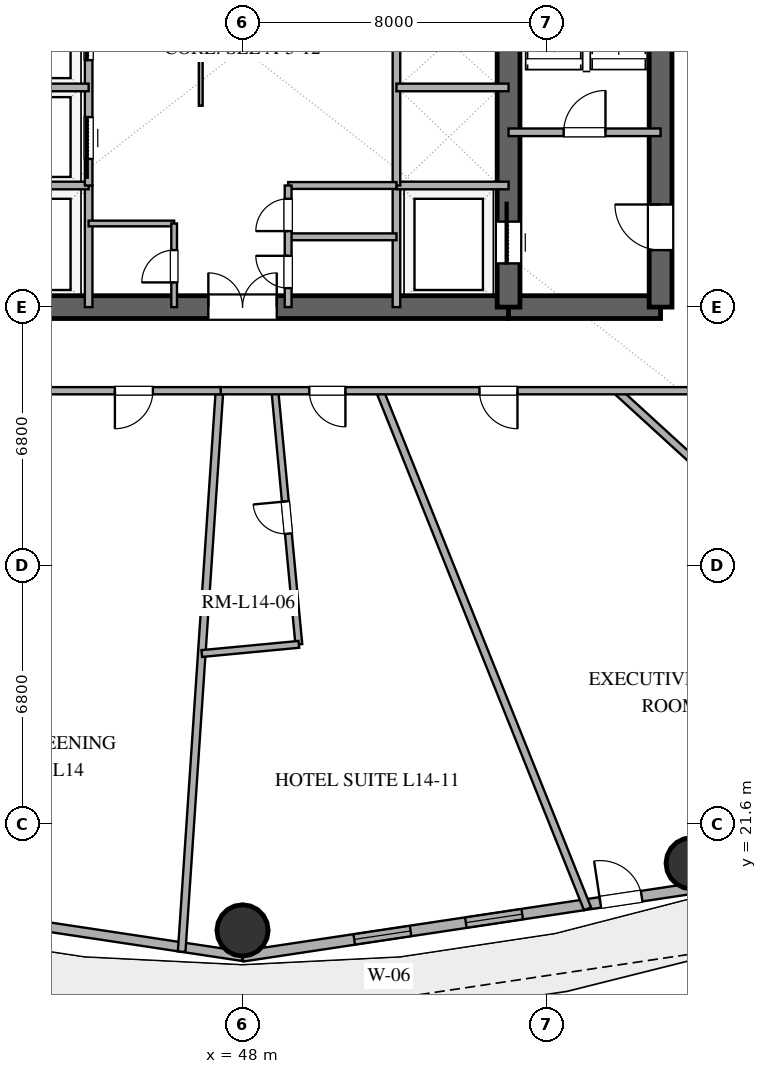
"""IFC4 building model, lengths in metres.
Left out: names, types, materials, properties, quantities, classifications, styles, units other than length and angle.
Written with IfcOpenShell. Run it as: python <this file> out.ifc"""

import sys

from ifc_helpers import new_model, si_unit, direction, frame, frame_2d, origin, origin_2d, place, context, subcontext, project, spatial, rectangle, hollow_circle, extrude, element, fill, save


model = new_model("IFC4")
c1 = context("Model", 3, precision=1e-05, world=origin(), true_north=direction((0.0, 1.0)))
c2 = subcontext(c1, "Body", "Model", "MODEL_VIEW")
j1 = project(units=[si_unit("LENGTHUNIT", "METRE"), si_unit("PLANEANGLEUNIT", "RADIAN")], contexts=[c1])
p1 = place(None, origin())
s1 = spatial("IfcSite", under=j1, at=p1, CompositionType="ELEMENT")
p2 = place(p1, origin())
s2 = spatial("IfcBuilding", under=s1, at=p2, CompositionType="ELEMENT")
p3 = place(p2, frame((0.0, 0.0, 60.6)))
s3 = spatial("IfcBuildingStorey", under=s2, at=p3, CompositionType="ELEMENT", Elevation=60.6)
p4 = place(p3, frame((41.0, 35.2, 0.0), z_axis=(0.0, 0.0, 1.0), x_axis=(1.0, 0.0, 0.0)))
e1 = element("IfcWall", 1, at=p4, inside=s3, PredefinedType="SHEAR", context=c2, shape_type="SweptSolid", body=[
    extrude(rectangle(XDim=14.0, YDim=0.6, at=frame_2d((7.0, 0.0))), origin(), (0.0, 0.0, 1.0), 3.38),
])
p5 = place(p4, frame((6.1, 0.0, 0.0)))
e2 = element("IfcOpeningElement", 2, at=p5, cuts=e1, PredefinedType="OPENING", context=c2, shape_type="SweptSolid", body=[
    extrude(rectangle(XDim=1.8, YDim=2.25, at=frame_2d((0.9, 1.125))), frame((0.0, 0.31, 0.0), z_axis=(0.0, -1.0, 0.0), x_axis=(1.0, 0.0, 0.0)), (0.0, 0.0, 1.0), 0.62),
])
p6 = place(p3, frame((55.0, 35.2, 0.0), z_axis=(0.0, 0.0, 1.0), x_axis=(1.0, 0.0, 0.0)))
e3 = element("IfcWall", 3, at=p6, inside=s3, PredefinedType="SHEAR", context=c2, shape_type="SweptSolid", body=[
    extrude(rectangle(XDim=4.0, YDim=0.6, at=frame_2d((2.0, 0.0))), origin(), (0.0, 0.0, 1.0), 3.38),
])
p7 = place(p3, frame((59.0, 35.2, 0.0), z_axis=(0.0, 0.0, 1.0), x_axis=(0.0, 1.0, 0.0)))
e4 = element("IfcWall", 4, at=p7, inside=s3, PredefinedType="SHEAR", context=c2, shape_type="SweptSolid", body=[
    extrude(rectangle(XDim=13.6, YDim=0.6, at=frame_2d((6.8, 0.0))), origin(), (0.0, 0.0, 1.0), 3.38),
])
p8 = place(p7, frame((1.5, 0.0, 0.0)))
e5 = element("IfcOpeningElement", 5, at=p8, cuts=e4, PredefinedType="OPENING", context=c2, shape_type="SweptSolid", body=[
    extrude(rectangle(XDim=1.2, YDim=2.15, at=frame_2d((0.6, 1.075))), frame((0.0, 0.31, 0.0), z_axis=(0.0, -1.0, 0.0), x_axis=(1.0, 0.0, 0.0)), (0.0, 0.0, 1.0), 0.62),
])
p9 = place(p3, frame((55.0, 35.2, 0.0), z_axis=(0.0, 0.0, 1.0), x_axis=(0.0, 1.0, 0.0)))
e6 = element("IfcWall", 6, at=p9, inside=s3, PredefinedType="SHEAR", context=c2, shape_type="SweptSolid", body=[
    extrude(rectangle(XDim=13.6, YDim=0.6, at=frame_2d((6.8, 0.0))), origin(), (0.0, 0.0, 1.0), 3.38),
])
p10 = place(p9, frame((1.15, 0.0, 0.0)))
e7 = element("IfcOpeningElement", 7, at=p10, cuts=e6, PredefinedType="OPENING", context=c2, shape_type="SweptSolid", body=[
    extrude(rectangle(XDim=1.1, YDim=2.2, at=frame_2d((0.55, 1.1))), frame((0.0, 0.31, 0.0), z_axis=(0.0, -1.0, 0.0), x_axis=(1.0, 0.0, 0.0)), (0.0, 0.0, 1.0), 0.62),
])
for number, where, z_axis, x_axis in (
    (8, (48.0, 18.8, 0.0), (0.0, 0.0, 1.0), (1.0, 0.0, 0.0)),
    (9, (59.818, 20.566, 0.0), (0.0, 0.0, 1.0), (1.0, 0.0, 0.0)),
):
    element("IfcColumn", number, at=place(p3, frame(where, z_axis=z_axis, x_axis=x_axis)), inside=s3, PredefinedType="COLUMN", context=c2, shape_type="SweptSolid", body=[
        extrude(hollow_circle(Radius=0.675, WallThickness=0.036, at=origin_2d()), origin(), (0.0, 0.0, 1.0), 3.38),
    ])
p11 = place(p3, frame((35.922, 19.938, 0.0), z_axis=(0.0, 0.0, 1.0), x_axis=(0.988864835849, -0.148816452121, 0.0)))
e10 = element("IfcWall", 10, at=p11, inside=s3, PredefinedType="SOLIDWALL", context=c2, shape_type="SweptSolid", body=[
    extrude(rectangle(XDim=12.214, YDim=0.25, at=frame_2d((6.107, 0.0))), origin(), (0.0, 0.0, 1.0), 3.38),
])
p12 = place(p3, frame((48.0, 18.12, 0.0), z_axis=(0.0, 0.0, 1.0), x_axis=(0.988864835849, 0.148816452121, 0.0)))
e11 = element("IfcWall", 11, at=p12, inside=s3, PredefinedType="SOLIDWALL", context=c2, shape_type="SweptSolid", body=[
    extrude(rectangle(XDim=12.214, YDim=0.28, at=frame_2d((6.107, 0.0))), origin(), (0.0, 0.0, 1.0), 3.38),
])
p13 = place(p12, frame((2.972, 0.0, 0.85)))
e12 = element("IfcOpeningElement", 12, at=p13, cuts=e11, PredefinedType="OPENING", context=c2, shape_type="SweptSolid", body=[
    extrude(rectangle(XDim=1.5, YDim=2.0, at=frame_2d((0.75, 1.0))), frame((0.0, 0.15, 0.0), z_axis=(0.0, -1.0, 0.0), x_axis=(1.0, 0.0, 0.0)), (0.0, 0.0, 1.0), 0.3),
])
p14 = place(p12, frame((5.942, 0.0, 0.85)))
e13 = element("IfcOpeningElement", 13, at=p14, cuts=e11, PredefinedType="OPENING", context=c2, shape_type="SweptSolid", body=[
    extrude(rectangle(XDim=1.5, YDim=2.0, at=frame_2d((0.75, 1.0))), frame((0.0, 0.15, 0.0), z_axis=(0.0, -1.0, 0.0), x_axis=(1.0, 0.0, 0.0)), (0.0, 0.0, 1.0), 0.3),
])
p15 = place(p12, frame((9.52, 0.0, 0.0)))
e14 = element("IfcOpeningElement", 14, at=p15, cuts=e11, PredefinedType="OPENING", context=c2, shape_type="SweptSolid", body=[
    extrude(rectangle(XDim=1.1, YDim=2.25, at=frame_2d((0.55, 1.125))), frame((0.0, 0.15, 0.0), z_axis=(0.0, -1.0, 0.0), x_axis=(1.0, 0.0, 0.0)), (0.0, 0.0, 1.0), 0.3),
])
p16 = place(p3, frame((55.0, 39.8, 0.0), z_axis=(0.0, 0.0, 1.0), x_axis=(1.0, 0.0, 0.0)))
e15 = element("IfcWall", 15, at=p16, inside=s3, PredefinedType="SOLIDWALL", context=c2, shape_type="SweptSolid", body=[
    extrude(rectangle(XDim=4.0, YDim=0.2, at=frame_2d((2.0, 0.0))), origin(), (0.0, 0.0, 1.0), 2.74),
])
p17 = place(p16, frame((1.45, 0.0, 0.0)))
e16 = element("IfcOpeningElement", 16, at=p17, cuts=e15, PredefinedType="OPENING", context=c2, shape_type="SweptSolid", body=[
    extrude(rectangle(XDim=1.1, YDim=2.15, at=frame_2d((0.55, 1.075))), frame((0.0, 0.11, 0.0), z_axis=(0.0, -1.0, 0.0), x_axis=(1.0, 0.0, 0.0)), (0.0, 0.0, 1.0), 0.22),
])
p18 = place(p3, frame((43.95, 35.2, 0.0), z_axis=(0.0, 0.0, 1.0), x_axis=(0.0, 1.0, 0.0)))
e17 = element("IfcWall", 17, at=p18, inside=s3, PredefinedType="SOLIDWALL", context=c2, shape_type="SweptSolid", body=[
    extrude(rectangle(XDim=3.2, YDim=0.2, at=frame_2d((1.6, 0.0))), origin(), (0.0, 0.0, 1.0), 2.74),
])
p19 = place(p3, frame((41.0, 38.4, 0.0), z_axis=(0.0, 0.0, 1.0), x_axis=(1.0, 0.0, 0.0)))
e18 = element("IfcWall", 18, at=p19, inside=s3, PredefinedType="SOLIDWALL", context=c2, shape_type="SweptSolid", body=[
    extrude(rectangle(XDim=2.95, YDim=0.2, at=frame_2d((1.475, 0.0))), origin(), (0.0, 0.0, 1.0), 2.74),
])
p20 = place(p3, frame((52.05, 35.2, 0.0), z_axis=(0.0, 0.0, 1.0), x_axis=(0.0, 1.0, 0.0)))
e19 = element("IfcWall", 19, at=p20, inside=s3, PredefinedType="SOLIDWALL", context=c2, shape_type="SweptSolid", body=[
    extrude(rectangle(XDim=3.2, YDim=0.2, at=frame_2d((1.6, 0.0))), origin(), (0.0, 0.0, 1.0), 2.74),
])
p21 = place(p3, frame((52.05, 38.4, 0.0), z_axis=(0.0, 0.0, 1.0), x_axis=(1.0, 0.0, 0.0)))
e20 = element("IfcWall", 20, at=p21, inside=s3, PredefinedType="SOLIDWALL", context=c2, shape_type="SweptSolid", body=[
    extrude(rectangle(XDim=2.95, YDim=0.2, at=frame_2d((1.475, 0.0))), origin(), (0.0, 0.0, 1.0), 2.74),
])
p22 = place(p3, frame((43.95, 38.4, 0.0), z_axis=(0.0, 0.0, 1.0), x_axis=(0.0, 1.0, 0.0)))
e21 = element("IfcWall", 21, at=p22, inside=s3, PredefinedType="SOLIDWALL", context=c2, shape_type="SweptSolid", body=[
    extrude(rectangle(XDim=7.8, YDim=0.2, at=frame_2d((3.9, 0.0))), origin(), (0.0, 0.0, 1.0), 2.74),
])
p23 = place(p22, frame((0.7, 0.0, 0.0)))
e22 = element("IfcOpeningElement", 22, at=p23, cuts=e21, PredefinedType="OPENING", context=c2, shape_type="SweptSolid", body=[
    extrude(rectangle(XDim=1.1, YDim=2.2, at=frame_2d((0.55, 1.1))), frame((0.0, 0.11, 0.0), z_axis=(0.0, -1.0, 0.0), x_axis=(1.0, 0.0, 0.0)), (0.0, 0.0, 1.0), 0.22),
])
p24 = place(p22, frame((3.3, 0.0, 0.0)))
e23 = element("IfcOpeningElement", 23, at=p24, cuts=e21, PredefinedType="OPENING", context=c2, shape_type="SweptSolid", body=[
    extrude(rectangle(XDim=1.1, YDim=2.2, at=frame_2d((0.55, 1.1))), frame((0.0, 0.11, 0.0), z_axis=(0.0, -1.0, 0.0), x_axis=(1.0, 0.0, 0.0)), (0.0, 0.0, 1.0), 0.22),
])
p25 = place(p3, frame((41.0, 40.98, 0.0), z_axis=(0.0, 0.0, 1.0), x_axis=(1.0, 0.0, 0.0)))
e24 = element("IfcWall", 24, at=p25, inside=s3, PredefinedType="SOLIDWALL", context=c2, shape_type="SweptSolid", body=[
    extrude(rectangle(XDim=2.95, YDim=0.2, at=frame_2d((1.475, 0.0))), origin(), (0.0, 0.0, 1.0), 2.74),
])
p26 = place(p3, frame((52.05, 38.4, 0.0), z_axis=(0.0, 0.0, 1.0), x_axis=(0.0, 1.0, 0.0)))
e25 = element("IfcWall", 25, at=p26, inside=s3, PredefinedType="SOLIDWALL", context=c2, shape_type="SweptSolid", body=[
    extrude(rectangle(XDim=10.4, YDim=0.2, at=frame_2d((5.2, 0.0))), origin(), (0.0, 0.0, 1.0), 2.74),
])
p27 = place(p26, frame((8.2, 0.0, 0.0)))
e26 = element("IfcOpeningElement", 26, at=p27, cuts=e25, PredefinedType="OPENING", context=c2, shape_type="SweptSolid", body=[
    extrude(rectangle(XDim=1.2, YDim=2.2, at=frame_2d((0.6, 1.1))), frame((0.0, 0.11, 0.0), z_axis=(0.0, -1.0, 0.0), x_axis=(1.0, 0.0, 0.0)), (0.0, 0.0, 1.0), 0.22),
])
p28 = place(p3, frame((52.05, 40.98, 0.0), z_axis=(0.0, 0.0, 1.0), x_axis=(1.0, 0.0, 0.0)))
e27 = element("IfcWall", 27, at=p28, inside=s3, PredefinedType="SOLIDWALL", context=c2, shape_type="SweptSolid", body=[
    extrude(rectangle(XDim=2.95, YDim=0.2, at=frame_2d((1.475, 0.0))), origin(), (0.0, 0.0, 1.0), 2.74),
])
p29 = place(p3, frame((43.95, 37.4, 0.0), z_axis=(0.0, 0.0, 1.0), x_axis=(1.0, 0.0, 0.0)))
e28 = element("IfcWall", 28, at=p29, inside=s3, PredefinedType="PARTITIONING", context=c2, shape_type="SweptSolid", body=[
    extrude(rectangle(XDim=2.25, YDim=0.15, at=frame_2d((1.125, 0.0))), origin(), (0.0, 0.0, 1.0), 2.74),
])
p30 = place(p3, frame((46.2, 35.2, 0.0), z_axis=(0.0, 0.0, 1.0), x_axis=(0.0, 1.0, 0.0)))
e29 = element("IfcWall", 29, at=p30, inside=s3, PredefinedType="PARTITIONING", context=c2, shape_type="SweptSolid", body=[
    extrude(rectangle(XDim=2.2, YDim=0.15, at=frame_2d((1.1, 0.0))), origin(), (0.0, 0.0, 1.0), 2.74),
])
p31 = place(p30, frame((0.65, 0.0, 0.0)))
e30 = element("IfcOpeningElement", 30, at=p31, cuts=e29, PredefinedType="OPENING", context=c2, shape_type="SweptSolid", body=[
    extrude(rectangle(XDim=0.85, YDim=2.15, at=frame_2d((0.425, 1.075))), frame((0.0, 0.085, 0.0), z_axis=(0.0, -1.0, 0.0), x_axis=(1.0, 0.0, 0.0)), (0.0, 0.0, 1.0), 0.17),
])
for number, where, z_axis, x_axis in (
    (31, (49.2, 37.05, 0.0), (0.0, 0.0, 1.0), (1.0, 0.0, 0.0)),
    (32, (49.2, 38.4, 0.0), (0.0, 0.0, 1.0), (1.0, 0.0, 0.0)),
):
    element("IfcWall", number, at=place(p3, frame(where, z_axis=z_axis, x_axis=x_axis)), inside=s3, PredefinedType="PLUMBINGWALL", context=c2, shape_type="SweptSolid", body=[
        extrude(rectangle(XDim=2.85, YDim=0.18, at=frame_2d((1.425, 0.0))), origin(), (0.0, 0.0, 1.0), 2.74),
    ])
p32 = place(p3, frame((49.2, 35.2, 0.0), z_axis=(0.0, 0.0, 1.0), x_axis=(0.0, 1.0, 0.0)))
e33 = element("IfcWall", 33, at=p32, inside=s3, PredefinedType="PLUMBINGWALL", context=c2, shape_type="SweptSolid", body=[
    extrude(rectangle(XDim=3.2, YDim=0.18, at=frame_2d((1.6, 0.0))), origin(), (0.0, 0.0, 1.0), 2.74),
])
p33 = place(p32, frame((0.5, 0.0, 0.0)))
e34 = element("IfcOpeningElement", 34, at=p33, cuts=e33, PredefinedType="OPENING", context=c2, shape_type="SweptSolid", body=[
    extrude(rectangle(XDim=0.85, YDim=2.1, at=frame_2d((0.425, 1.05))), frame((0.0, 0.1, 0.0), z_axis=(0.0, -1.0, 0.0), x_axis=(1.0, 0.0, 0.0)), (0.0, 0.0, 1.0), 0.2),
])
p34 = place(p32, frame((2.0, 0.0, 0.0)))
e35 = element("IfcOpeningElement", 35, at=p34, cuts=e33, PredefinedType="OPENING", context=c2, shape_type="SweptSolid", body=[
    extrude(rectangle(XDim=0.85, YDim=2.15, at=frame_2d((0.425, 1.075))), frame((0.0, 0.1, 0.0), z_axis=(0.0, -1.0, 0.0), x_axis=(1.0, 0.0, 0.0)), (0.0, 0.0, 1.0), 0.2),
])
p35 = place(p3, frame((51.61, 33.0, 0.0), z_axis=(0.0, 0.0, 1.0), x_axis=(0.372301847193, -0.928111703717, 0.0)))
e36 = element("IfcWall", 36, at=p35, inside=s3, PredefinedType="PARTITIONING", context=c2, shape_type="SweptSolid", body=[
    extrude(rectangle(XDim=14.688, YDim=0.2, at=frame_2d((7.344, 0.0))), origin(), (0.0, 0.0, 1.0), 2.74),
])
p36 = place(p3, frame((47.393, 33.0, 0.0), z_axis=(0.0, 0.0, 1.0), x_axis=(-0.067284649742, -0.997733820169, 0.0)))
e37 = element("IfcWall", 37, at=p36, inside=s3, PredefinedType="PARTITIONING", context=c2, shape_type="SweptSolid", body=[
    extrude(rectangle(XDim=14.793, YDim=0.2, at=frame_2d((7.396, 0.0))), origin(), (0.0, 0.0, 1.0), 2.74),
])
p37 = place(p3, frame((57.846, 33.0, 0.0), z_axis=(0.0, 0.0, 1.0), x_axis=(0.738119160364, -0.674670367738, 0.0)))
e38 = element("IfcWall", 38, at=p37, inside=s3, PredefinedType="PARTITIONING", context=c2, shape_type="SweptSolid", body=[
    extrude(rectangle(XDim=13.61, YDim=0.2, at=frame_2d((6.805, 0.0))), origin(), (0.0, 0.0, 1.0), 2.74),
])
p38 = place(p3, frame((49.482, 26.326, 0.0), z_axis=(0.0, 0.0, 1.0), x_axis=(-0.094107851527, 0.995562008255, 0.0)))
e39 = element("IfcWall", 39, at=p38, inside=s3, PredefinedType="PLUMBINGWALL", context=c2, shape_type="SweptSolid", body=[
    extrude(rectangle(XDim=6.704, YDim=0.18, at=frame_2d((3.352, 0.0))), origin(), (0.0, 0.0, 1.0), 2.74),
])
p39 = place(p38, frame((2.927, 0.0, 0.0)))
e40 = element("IfcOpeningElement", 40, at=p39, cuts=e39, PredefinedType="OPENING", context=c2, shape_type="SweptSolid", body=[
    extrude(rectangle(XDim=0.85, YDim=2.1, at=frame_2d((0.425, 1.05))), frame((0.0, 0.1, 0.0), z_axis=(0.0, -1.0, 0.0), x_axis=(1.0, 0.0, 0.0)), (0.0, 0.0, 1.0), 0.2),
])
p40 = place(p3, frame((61.2, 33.0, 0.0), z_axis=(0.0, 0.0, 1.0), x_axis=(-1.0, 0.0, 0.0)))
e41 = element("IfcWall", 41, at=p40, inside=s3, PredefinedType="PARTITIONING", context=c2, shape_type="SweptSolid", body=[
    extrude(rectangle(XDim=13.839, YDim=0.19, at=frame_2d((6.919, 0.0))), origin(), (0.0, 0.0, 1.0), 2.74),
])
p41 = place(p40, frame((5.965, 0.0, 0.0)))
e42 = element("IfcOpeningElement", 42, at=p41, cuts=e41, PredefinedType="OPENING", context=c2, shape_type="SweptSolid", body=[
    extrude(rectangle(XDim=1.0, YDim=2.2, at=frame_2d((0.5, 1.1))), frame((0.0, 0.105, 0.0), z_axis=(0.0, -1.0, 0.0), x_axis=(1.0, 0.0, 0.0)), (0.0, 0.0, 1.0), 0.21),
])
p42 = place(p40, frame((10.493, 0.0, 0.0)))
e43 = element("IfcOpeningElement", 43, at=p42, cuts=e41, PredefinedType="OPENING", context=c2, shape_type="SweptSolid", body=[
    extrude(rectangle(XDim=0.95, YDim=2.15, at=frame_2d((0.475, 1.075))), frame((0.0, 0.105, 0.0), z_axis=(0.0, -1.0, 0.0), x_axis=(1.0, 0.0, 0.0)), (0.0, 0.0, 1.0), 0.21),
])
p43 = place(p3, frame((47.425, 33.0, 0.0), z_axis=(0.0, 0.0, 1.0), x_axis=(-1.0, 0.0, 0.0)))
e44 = element("IfcWall", 44, at=p43, inside=s3, PredefinedType="PARTITIONING", context=c2, shape_type="SweptSolid", body=[
    extrude(rectangle(XDim=12.625, YDim=0.19, at=frame_2d((6.312, 0.0))), origin(), (0.0, 0.0, 1.0), 2.74),
])
p44 = place(p43, frame((1.784, 0.0, 0.0)))
e45 = element("IfcOpeningElement", 45, at=p44, cuts=e44, PredefinedType="OPENING", context=c2, shape_type="SweptSolid", body=[
    extrude(rectangle(XDim=1.0, YDim=2.2, at=frame_2d((0.5, 1.1))), frame((0.0, 0.105, 0.0), z_axis=(0.0, -1.0, 0.0), x_axis=(1.0, 0.0, 0.0)), (0.0, 0.0, 1.0), 0.21),
])
p45 = place(p43, frame((6.173, 0.0, 0.0)))
e46 = element("IfcOpeningElement", 46, at=p45, cuts=e44, PredefinedType="OPENING", context=c2, shape_type="SweptSolid", body=[
    extrude(rectangle(XDim=0.95, YDim=2.15, at=frame_2d((0.475, 1.075))), frame((0.0, 0.105, 0.0), z_axis=(0.0, -1.0, 0.0), x_axis=(1.0, 0.0, 0.0)), (0.0, 0.0, 1.0), 0.21),
])
p46 = place(p3, frame((46.927, 26.085, 0.0), z_axis=(0.0, 0.0, 1.0), x_axis=(0.995563205557, 0.09409518447, 0.0)))
e47 = element("IfcWall", 47, at=p46, inside=s3, PredefinedType="PLUMBINGWALL", context=c2, shape_type="SweptSolid", body=[
    extrude(rectangle(XDim=2.566, YDim=0.18, at=frame_2d((1.283, 0.0))), origin(), (0.0, 0.0, 1.0), 2.74),
])
p47 = place(p3, frame((46.9, 40.5, 0.0), z_axis=(0.0, 0.0, 1.0), x_axis=(0.0, 1.0, 0.0)))
e48 = element("IfcWall", 48, at=p47, inside=s3, PredefinedType="MOVABLE", context=c2, shape_type="SweptSolid", body=[
    extrude(rectangle(XDim=2.7, YDim=0.1, at=frame_2d((1.35, 0.0))), origin(), (0.0, 0.0, 1.0), 2.74),
])
p48 = place(p13, origin())
e49 = element("IfcWindow", 49, at=p48, inside=s3, PartitioningType="SINGLE_PANEL", PredefinedType="WINDOW", context=c2, shape_type="SweptSolid", body=[
    extrude(rectangle(XDim=1.5, YDim=2.0, at=frame_2d((0.75, 1.0))), frame((0.0, 0.03, 0.0), z_axis=(0.0, -1.0, 0.0), x_axis=(1.0, 0.0, 0.0)), (0.0, 0.0, 1.0), 0.06),
])
fill(e12, e49)
p49 = place(p14, origin())
e50 = element("IfcWindow", 50, at=p49, inside=s3, PartitioningType="SINGLE_PANEL", PredefinedType="WINDOW", context=c2, shape_type="SweptSolid", body=[
    extrude(rectangle(XDim=1.5, YDim=2.0, at=frame_2d((0.75, 1.0))), frame((0.0, 0.03, 0.0), z_axis=(0.0, -1.0, 0.0), x_axis=(1.0, 0.0, 0.0)), (0.0, 0.0, 1.0), 0.06),
])
fill(e13, e50)
p50 = place(p15, origin())
e51 = element("IfcDoor", 51, at=p50, inside=s3, OperationType="SINGLE_SWING_LEFT", PredefinedType="DOOR", context=c2, shape_type="SweptSolid", body=[
    extrude(rectangle(XDim=1.1, YDim=2.25, at=frame_2d((0.55, 1.125))), frame((0.0, 0.025, 0.0), z_axis=(0.0, -1.0, 0.0), x_axis=(1.0, 0.0, 0.0)), (0.0, 0.0, 1.0), 0.05),
])
fill(e14, e51)
p51 = place(p10, origin())
e52 = element("IfcDoor", 52, at=p51, inside=s3, OperationType="SLIDING_TO_RIGHT", PredefinedType="DOOR", context=c2, shape_type="SweptSolid", body=[
    extrude(rectangle(XDim=1.1, YDim=2.2, at=frame_2d((0.55, 1.1))), frame((0.0, 0.025, 0.0), z_axis=(0.0, -1.0, 0.0), x_axis=(1.0, 0.0, 0.0)), (0.0, 0.0, 1.0), 0.05),
])
fill(e7, e52)
p52 = place(p8, origin())
e53 = element("IfcDoor", 53, at=p52, inside=s3, OperationType="SINGLE_SWING_RIGHT", PredefinedType="DOOR", context=c2, shape_type="SweptSolid", body=[
    extrude(rectangle(XDim=1.2, YDim=2.15, at=frame_2d((0.6, 1.075))), frame((0.0, 0.025, 0.0), z_axis=(0.0, -1.0, 0.0), x_axis=(1.0, 0.0, 0.0)), (0.0, 0.0, 1.0), 0.05),
])
fill(e5, e53)
p53 = place(p5, origin())
e54 = element("IfcDoor", 54, at=p53, inside=s3, OperationType="DOUBLE_DOOR_SINGLE_SWING", PredefinedType="DOOR", context=c2, shape_type="SweptSolid", body=[
    extrude(rectangle(XDim=1.8, YDim=2.25, at=frame_2d((0.9, 1.125))), frame((0.0, 0.025, 0.0), z_axis=(0.0, -1.0, 0.0), x_axis=(1.0, 0.0, 0.0)), (0.0, 0.0, 1.0), 0.05),
])
fill(e2, e54)
p54 = place(p17, origin())
e55 = element("IfcDoor", 55, at=p54, inside=s3, OperationType="SINGLE_SWING_RIGHT", PredefinedType="DOOR", context=c2, shape_type="SweptSolid", body=[
    extrude(rectangle(XDim=1.1, YDim=2.15, at=frame_2d((0.55, 1.075))), frame((0.0, 0.025, 0.0), z_axis=(0.0, -1.0, 0.0), x_axis=(1.0, 0.0, 0.0)), (0.0, 0.0, 1.0), 0.05),
])
fill(e16, e55)
p55 = place(p23, origin())
e56 = element("IfcDoor", 56, at=p55, inside=s3, OperationType="SLIDING_TO_LEFT", PredefinedType="DOOR", context=c2, shape_type="SweptSolid", body=[
    extrude(rectangle(XDim=1.1, YDim=2.2, at=frame_2d((0.55, 1.1))), frame((0.0, 0.025, 0.0), z_axis=(0.0, -1.0, 0.0), x_axis=(1.0, 0.0, 0.0)), (0.0, 0.0, 1.0), 0.05),
])
fill(e22, e56)
p56 = place(p24, origin())
e57 = element("IfcDoor", 57, at=p56, inside=s3, OperationType="SLIDING_TO_RIGHT", PredefinedType="DOOR", context=c2, shape_type="SweptSolid", body=[
    extrude(rectangle(XDim=1.1, YDim=2.2, at=frame_2d((0.55, 1.1))), frame((0.0, 0.025, 0.0), z_axis=(0.0, -1.0, 0.0), x_axis=(1.0, 0.0, 0.0)), (0.0, 0.0, 1.0), 0.05),
])
fill(e23, e57)
p57 = place(p31, origin())
e58 = element("IfcDoor", 58, at=p57, inside=s3, OperationType="SINGLE_SWING_LEFT", PredefinedType="DOOR", context=c2, shape_type="SweptSolid", body=[
    extrude(rectangle(XDim=0.85, YDim=2.15, at=frame_2d((0.425, 1.075))), frame((0.0, 0.025, 0.0), z_axis=(0.0, -1.0, 0.0), x_axis=(1.0, 0.0, 0.0)), (0.0, 0.0, 1.0), 0.05),
])
fill(e30, e58)
p58 = place(p33, origin())
e59 = element("IfcDoor", 59, at=p58, inside=s3, OperationType="SINGLE_SWING_RIGHT", PredefinedType="DOOR", context=c2, shape_type="SweptSolid", body=[
    extrude(rectangle(XDim=0.85, YDim=2.1, at=frame_2d((0.425, 1.05))), frame((0.0, 0.025, 0.0), z_axis=(0.0, -1.0, 0.0), x_axis=(1.0, 0.0, 0.0)), (0.0, 0.0, 1.0), 0.05),
])
fill(e34, e59)
p59 = place(p34, origin())
e60 = element("IfcDoor", 60, at=p59, inside=s3, OperationType="SINGLE_SWING_LEFT", PredefinedType="DOOR", context=c2, shape_type="SweptSolid", body=[
    extrude(rectangle(XDim=0.85, YDim=2.15, at=frame_2d((0.425, 1.075))), frame((0.0, 0.025, 0.0), z_axis=(0.0, -1.0, 0.0), x_axis=(1.0, 0.0, 0.0)), (0.0, 0.0, 1.0), 0.05),
])
fill(e35, e60)
p60 = place(p39, origin())
e61 = element("IfcDoor", 61, at=p60, inside=s3, OperationType="SINGLE_SWING_RIGHT", PredefinedType="DOOR", context=c2, shape_type="SweptSolid", body=[
    extrude(rectangle(XDim=0.85, YDim=2.1, at=frame_2d((0.425, 1.05))), frame((0.0, 0.025, 0.0), z_axis=(0.0, -1.0, 0.0), x_axis=(1.0, 0.0, 0.0)), (0.0, 0.0, 1.0), 0.05),
])
fill(e40, e61)
p61 = place(p41, origin())
e62 = element("IfcDoor", 62, at=p61, inside=s3, OperationType="SINGLE_SWING_LEFT", PredefinedType="DOOR", context=c2, shape_type="SweptSolid", body=[
    extrude(rectangle(XDim=1.0, YDim=2.2, at=frame_2d((0.5, 1.1))), frame((0.0, 0.025, 0.0), z_axis=(0.0, -1.0, 0.0), x_axis=(1.0, 0.0, 0.0)), (0.0, 0.0, 1.0), 0.05),
])
fill(e42, e62)
p62 = place(p42, origin())
e63 = element("IfcDoor", 63, at=p62, inside=s3, OperationType="SINGLE_SWING_LEFT", PredefinedType="DOOR", context=c2, shape_type="SweptSolid", body=[
    extrude(rectangle(XDim=0.95, YDim=2.15, at=frame_2d((0.475, 1.075))), frame((0.0, 0.025, 0.0), z_axis=(0.0, -1.0, 0.0), x_axis=(1.0, 0.0, 0.0)), (0.0, 0.0, 1.0), 0.05),
])
fill(e43, e63)
p63 = place(p44, origin())
e64 = element("IfcDoor", 64, at=p63, inside=s3, OperationType="SINGLE_SWING_RIGHT", PredefinedType="DOOR", context=c2, shape_type="SweptSolid", body=[
    extrude(rectangle(XDim=1.0, YDim=2.2, at=frame_2d((0.5, 1.1))), frame((0.0, 0.025, 0.0), z_axis=(0.0, -1.0, 0.0), x_axis=(1.0, 0.0, 0.0)), (0.0, 0.0, 1.0), 0.05),
])
fill(e45, e64)
save(model, sys.argv[1])
